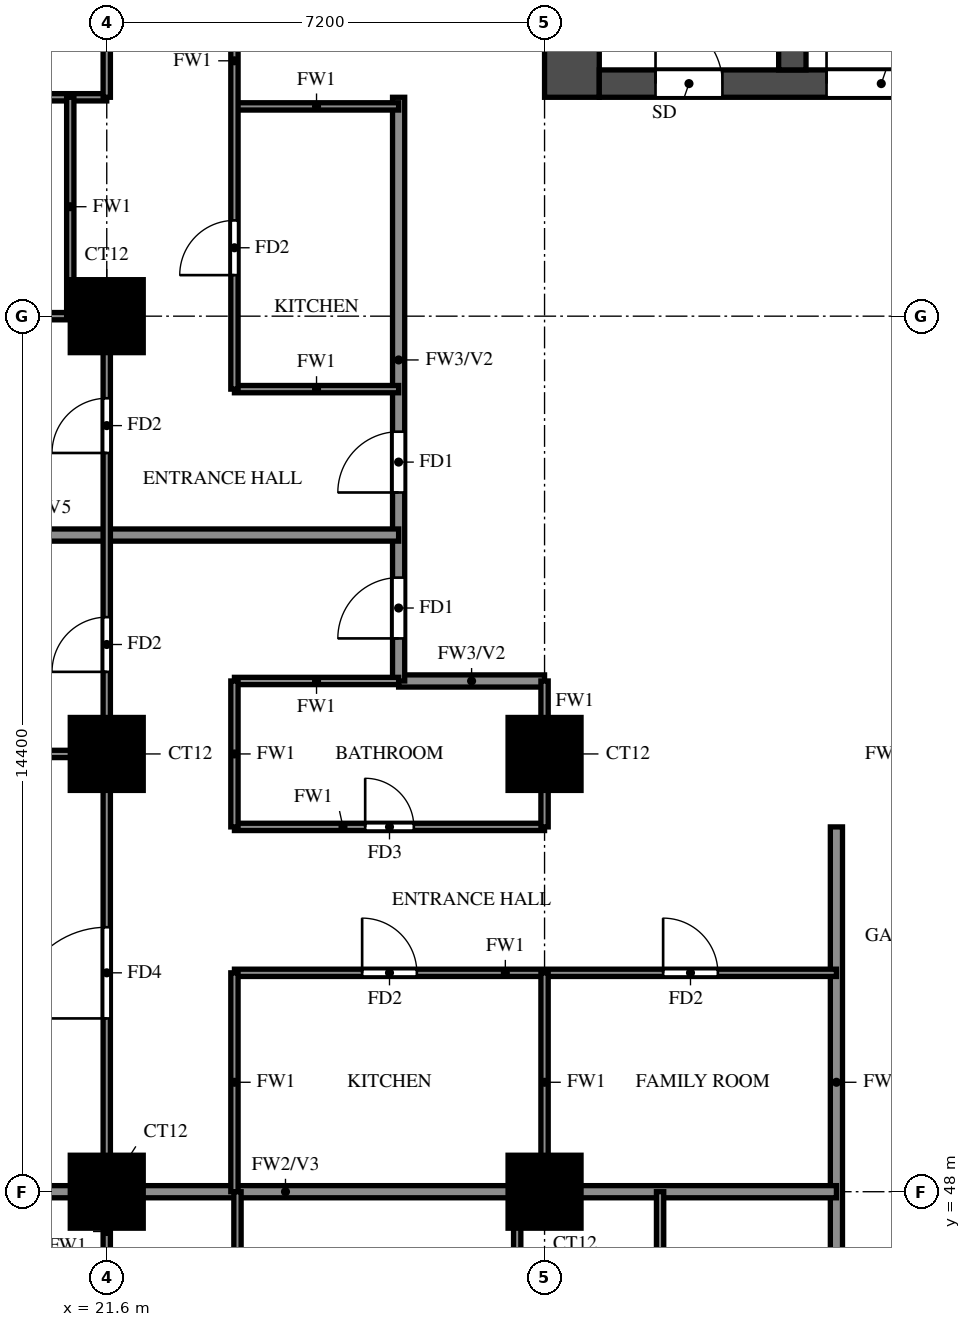
"""IFC4 building model, lengths in metres.
Left out: names, types, materials, properties, quantities, classifications, styles, units other than length and angle.
Written with IfcOpenShell. Run it as: python <this file> out.ifc"""

import sys

from ifc_helpers import new_model, si_unit, direction, frame, frame_2d, origin, origin_2d, place, context, subcontext, project, spatial, rectangle, extrude, source, transform, mapped, element, fill, save


model = new_model("IFC4")
c1 = context("Model", 3, precision=1e-05, world=origin(), true_north=direction((0.0, 1.0)))
c2 = subcontext(c1, "Body", "Model", "MODEL_VIEW")
j1 = project(units=[si_unit("LENGTHUNIT", "METRE"), si_unit("PLANEANGLEUNIT", "RADIAN")], contexts=[c1])
p1 = place(None, origin())
s1 = spatial("IfcSite", under=j1, at=p1, CompositionType="ELEMENT")
p2 = place(p1, origin())
s2 = spatial("IfcBuilding", under=s1, at=p2, CompositionType="ELEMENT")
p3 = place(p2, frame((0.0, 0.0, 93.5)))
s3 = spatial("IfcBuildingStorey", under=s2, at=p3, CompositionType="ELEMENT", Elevation=93.5)
m1 = source(origin(), c2, "Body", "SweptSolid", [
    extrude(rectangle(XDim=1.2, YDim=1.2, at=origin_2d()), origin(), (0.0, 0.0, 1.0), 3.18),
])
for number, where, z_axis, x_axis in (
    (1, (21.6, 48.0, 0.0), (0.0, 0.0, 1.0), (1.0, 0.0, 0.0)),
    (2, (28.8, 48.0, 0.0), (0.0, 0.0, 1.0), (1.0, 0.0, 0.0)),
    (3, (21.6, 55.2, 0.0), (0.0, 0.0, 1.0), (1.0, 0.0, 0.0)),
    (4, (28.8, 55.2, 0.0), (0.0, 0.0, 1.0), (1.0, 0.0, 0.0)),
    (5, (21.6, 62.4, 0.0), (0.0, 0.0, 1.0), (1.0, 0.0, 0.0)),
):
    element("IfcColumn", number, at=place(p3, frame(where, z_axis=z_axis, x_axis=x_axis)), inside=s3, PredefinedType="COLUMN", context=c2, shape_type="MappedRepresentation", body=[
        mapped(m1, transform((0.0, 0.0, 0.0))),
    ])
p4 = place(p3, frame((29.25, 66.0, 0.0), z_axis=(0.0, 0.0, 1.0), x_axis=(0.0, 1.0, 0.0)))
e6 = element("IfcWall", 6, at=p4, inside=s3, PredefinedType="SHEAR", context=c2, shape_type="SweptSolid", body=[
    extrude(rectangle(XDim=12.0, YDim=0.9, at=frame_2d((6.0, 0.0))), origin(), (0.0, 0.0, 1.0), 3.18),
])
p5 = place(p3, frame((29.7, 66.225, 0.0), z_axis=(0.0, 0.0, 1.0), x_axis=(1.0, 0.0, 0.0)))
e7 = element("IfcWall", 7, at=p5, inside=s3, PredefinedType="SHEAR", context=c2, shape_type="SweptSolid", body=[
    extrude(rectangle(XDim=41.4, YDim=0.45, at=frame_2d((20.7, 0.0))), origin(), (0.0, 0.0, 1.0), 3.18),
])
p6 = place(p5, frame((0.925, 0.0, 0.0)))
e8 = element("IfcOpeningElement", 8, at=p6, cuts=e7, PredefinedType="OPENING", context=c2, shape_type="SweptSolid", body=[
    extrude(rectangle(XDim=1.1, YDim=2.1, at=frame_2d((0.55, 1.05))), frame((0.0, 0.235, 0.0), z_axis=(0.0, -1.0, 0.0), x_axis=(1.0, 0.0, 0.0)), (0.0, 0.0, 1.0), 0.47),
])
p7 = place(p5, frame((3.738, 0.0, 0.0)))
e9 = element("IfcOpeningElement", 9, at=p7, cuts=e7, PredefinedType="OPENING", context=c2, shape_type="SweptSolid", body=[
    extrude(rectangle(XDim=1.8, YDim=2.1, at=frame_2d((0.9, 1.05))), frame((0.0, 0.235, 0.0), z_axis=(0.0, -1.0, 0.0), x_axis=(1.0, 0.0, 0.0)), (0.0, 0.0, 1.0), 0.47),
])
p8 = place(p3, frame((32.875, 66.45, 0.0), z_axis=(0.0, 0.0, 1.0), x_axis=(0.0, 1.0, 0.0)))
e10 = element("IfcWall", 10, at=p8, inside=s3, PredefinedType="SHEAR", context=c2, shape_type="SweptSolid", body=[
    extrude(rectangle(XDim=10.65, YDim=0.45, at=frame_2d((5.325, 0.0))), origin(), (0.0, 0.0, 1.0), 3.18),
])
p9 = place(p3, frame((26.4, 56.4, 0.0), z_axis=(0.0, 0.0, 1.0), x_axis=(1.0, 0.0, 0.0)))
e11 = element("IfcWall", 11, at=p9, inside=s3, PredefinedType="SOLIDWALL", context=c2, shape_type="SweptSolid", body=[
    extrude(rectangle(XDim=2.4, YDim=0.2, at=frame_2d((1.2, 0.0))), origin(), (0.0, 0.0, 1.0), 3.18),
])
p10 = place(p3, frame((26.4, 56.4, 0.0), z_axis=(0.0, 0.0, 1.0), x_axis=(0.0, 1.0, 0.0)))
e12 = element("IfcWall", 12, at=p10, inside=s3, PredefinedType="SOLIDWALL", context=c2, shape_type="SweptSolid", body=[
    extrude(rectangle(XDim=9.6, YDim=0.2, at=frame_2d((4.8, 0.0))), origin(), (0.0, 0.0, 1.0), 3.18),
])
p11 = place(p10, frame((0.7, 0.0, 0.0)))
e13 = element("IfcOpeningElement", 13, at=p11, cuts=e12, PredefinedType="OPENING", context=c2, shape_type="SweptSolid", body=[
    extrude(rectangle(XDim=1.0, YDim=2.1, at=frame_2d((0.5, 1.05))), frame((0.0, 0.11, 0.0), z_axis=(0.0, -1.0, 0.0), x_axis=(1.0, 0.0, 0.0)), (0.0, 0.0, 1.0), 0.22),
])
p12 = place(p10, frame((3.1, 0.0, 0.0)))
e14 = element("IfcOpeningElement", 14, at=p12, cuts=e12, PredefinedType="OPENING", context=c2, shape_type="SweptSolid", body=[
    extrude(rectangle(XDim=1.0, YDim=2.1, at=frame_2d((0.5, 1.05))), frame((0.0, 0.11, 0.0), z_axis=(0.0, -1.0, 0.0), x_axis=(1.0, 0.0, 0.0)), (0.0, 0.0, 1.0), 0.22),
])
p13 = place(p3, frame((33.6, 45.6, 0.0), z_axis=(0.0, 0.0, 1.0), x_axis=(0.0, 1.0, 0.0)))
e15 = element("IfcWall", 15, at=p13, inside=s3, PredefinedType="SOLIDWALL", context=c2, shape_type="SweptSolid", body=[
    extrude(rectangle(XDim=8.4, YDim=0.2, at=frame_2d((4.2, 0.0))), origin(), (0.0, 0.0, 1.0), 3.18),
])
p14 = place(p3, frame((14.525, 48.0, 0.0), z_axis=(0.0, 0.0, 1.0), x_axis=(1.0, 0.0, 0.0)))
e16 = element("IfcWall", 16, at=p14, inside=s3, PredefinedType="SOLIDWALL", context=c2, shape_type="SweptSolid", body=[
    extrude(rectangle(XDim=19.075, YDim=0.2, at=frame_2d((9.538, 0.0))), origin(), (0.0, 0.0, 1.0), 3.18),
])
p15 = place(p3, frame((14.525, 58.8, 0.0), z_axis=(0.0, 0.0, 1.0), x_axis=(1.0, 0.0, 0.0)))
e17 = element("IfcWall", 17, at=p15, inside=s3, PredefinedType="SOLIDWALL", context=c2, shape_type="SweptSolid", body=[
    extrude(rectangle(XDim=11.875, YDim=0.2, at=frame_2d((5.938, 0.0))), origin(), (0.0, 0.0, 1.0), 2.28),
])
p16 = place(p3, frame((23.7, 51.6, 0.0), z_axis=(0.0, 0.0, 1.0), x_axis=(1.0, 0.0, 0.0)))
e18 = element("IfcWall", 18, at=p16, inside=s3, PredefinedType="PARTITIONING", context=c2, shape_type="SweptSolid", body=[
    extrude(rectangle(XDim=9.9, YDim=0.12, at=frame_2d((4.95, 0.0))), origin(), (0.0, 0.0, 1.0), 3.18),
])
p17 = place(p16, frame((2.1, 0.0, 0.0)))
e19 = element("IfcOpeningElement", 19, at=p17, cuts=e18, PredefinedType="OPENING", context=c2, shape_type="SweptSolid", body=[
    extrude(rectangle(XDim=0.9, YDim=2.1, at=frame_2d((0.45, 1.05))), frame((0.0, 0.07, 0.0), z_axis=(0.0, -1.0, 0.0), x_axis=(1.0, 0.0, 0.0)), (0.0, 0.0, 1.0), 0.14),
])
p18 = place(p16, frame((7.05, 0.0, 0.0)))
e20 = element("IfcOpeningElement", 20, at=p18, cuts=e18, PredefinedType="OPENING", context=c2, shape_type="SweptSolid", body=[
    extrude(rectangle(XDim=0.9, YDim=2.1, at=frame_2d((0.45, 1.05))), frame((0.0, 0.07, 0.0), z_axis=(0.0, -1.0, 0.0), x_axis=(1.0, 0.0, 0.0)), (0.0, 0.0, 1.0), 0.14),
])
p19 = place(p3, frame((23.7, 54.0, 0.0), z_axis=(0.0, 0.0, 1.0), x_axis=(1.0, 0.0, 0.0)))
e21 = element("IfcWall", 21, at=p19, inside=s3, PredefinedType="PARTITIONING", context=c2, shape_type="SweptSolid", body=[
    extrude(rectangle(XDim=5.1, YDim=0.12, at=frame_2d((2.55, 0.0))), origin(), (0.0, 0.0, 1.0), 3.18),
])
p20 = place(p19, frame((2.15, 0.0, 0.0)))
e22 = element("IfcOpeningElement", 22, at=p20, cuts=e21, PredefinedType="OPENING", context=c2, shape_type="SweptSolid", body=[
    extrude(rectangle(XDim=0.8, YDim=2.1, at=frame_2d((0.4, 1.05))), frame((0.0, 0.07, 0.0), z_axis=(0.0, -1.0, 0.0), x_axis=(1.0, 0.0, 0.0)), (0.0, 0.0, 1.0), 0.14),
])
p21 = place(p3, frame((14.525, 55.2, 0.0), z_axis=(0.0, 0.0, 1.0), x_axis=(1.0, 0.0, 0.0)))
e23 = element("IfcWall", 23, at=p21, inside=s3, PredefinedType="PARTITIONING", context=c2, shape_type="SweptSolid", body=[
    extrude(rectangle(XDim=7.075, YDim=0.12, at=frame_2d((3.538, 0.0))), origin(), (0.0, 0.0, 1.0), 3.18),
])
for number, where, z_axis, x_axis in (
    (24, (23.7, 56.4, 0.0), (0.0, 0.0, 1.0), (1.0, 0.0, 0.0)),
    (25, (23.7, 61.2, 0.0), (0.0, 0.0, 1.0), (1.0, 0.0, 0.0)),
):
    element("IfcWall", number, at=place(p3, frame(where, z_axis=z_axis, x_axis=x_axis)), inside=s3, PredefinedType="PARTITIONING", context=c2, shape_type="SweptSolid", body=[
        extrude(rectangle(XDim=2.7, YDim=0.12, at=frame_2d((1.35, 0.0))), origin(), (0.0, 0.0, 1.0), 3.18),
    ])
p22 = place(p3, frame((14.525, 62.4, 0.0), z_axis=(0.0, 0.0, 1.0), x_axis=(1.0, 0.0, 0.0)))
e26 = element("IfcWall", 26, at=p22, inside=s3, PredefinedType="PARTITIONING", context=c2, shape_type="SweptSolid", body=[
    extrude(rectangle(XDim=7.075, YDim=0.12, at=frame_2d((3.538, 0.0))), origin(), (0.0, 0.0, 1.0), 3.18),
])
p23 = place(p22, frame((2.837, 0.0, 0.0)))
e27 = element("IfcOpeningElement", 27, at=p23, cuts=e26, PredefinedType="OPENING", context=c2, shape_type="SweptSolid", body=[
    extrude(rectangle(XDim=0.8, YDim=2.1, at=frame_2d((0.4, 1.05))), frame((0.0, 0.07, 0.0), z_axis=(0.0, -1.0, 0.0), x_axis=(1.0, 0.0, 0.0)), (0.0, 0.0, 1.0), 0.14),
])
p24 = place(p3, frame((23.7, 65.85, 0.0), z_axis=(0.0, 0.0, 1.0), x_axis=(1.0, 0.0, 0.0)))
e28 = element("IfcWall", 28, at=p24, inside=s3, PredefinedType="PARTITIONING", context=c2, shape_type="SweptSolid", body=[
    extrude(rectangle(XDim=2.7, YDim=0.12, at=frame_2d((1.35, 0.0))), origin(), (0.0, 0.0, 1.0), 3.18),
])
p25 = place(p3, frame((14.525, 66.0, 0.0), z_axis=(0.0, 0.0, 1.0), x_axis=(1.0, 0.0, 0.0)))
e29 = element("IfcWall", 29, at=p25, inside=s3, PredefinedType="PARTITIONING", context=c2, shape_type="SweptSolid", body=[
    extrude(rectangle(XDim=7.075, YDim=0.12, at=frame_2d((3.538, 0.0))), origin(), (0.0, 0.0, 1.0), 2.28),
])
p26 = place(p3, frame((21.0, 62.4, 0.0), z_axis=(0.0, 0.0, 1.0), x_axis=(0.0, 1.0, 0.0)))
e30 = element("IfcWall", 30, at=p26, inside=s3, PredefinedType="PARTITIONING", context=c2, shape_type="SweptSolid", body=[
    extrude(rectangle(XDim=3.6, YDim=0.12, at=frame_2d((1.8, 0.0))), origin(), (0.0, 0.0, 1.0), 3.18),
])
p27 = place(p3, frame((21.6, 33.725, 0.0), z_axis=(0.0, 0.0, 1.0), x_axis=(0.0, 1.0, 0.0)))
e31 = element("IfcWall", 31, at=p27, inside=s3, PredefinedType="PARTITIONING", context=c2, shape_type="SweptSolid", body=[
    extrude(rectangle(XDim=28.675, YDim=0.12, at=frame_2d((14.337, 0.0))), origin(), (0.0, 0.0, 1.0), 3.18),
])
p28 = place(p27, frame((7.775, 0.0, 0.0)))
e32 = element("IfcOpeningElement", 32, at=p28, cuts=e31, PredefinedType="OPENING", context=c2, shape_type="SweptSolid", body=[
    extrude(rectangle(XDim=0.9, YDim=2.1, at=frame_2d((0.45, 1.05))), frame((0.0, 0.07, 0.0), z_axis=(0.0, -1.0, 0.0), x_axis=(1.0, 0.0, 0.0)), (0.0, 0.0, 1.0), 0.14),
])
p29 = place(p27, frame((17.125, 0.0, 0.0)))
e33 = element("IfcOpeningElement", 33, at=p29, cuts=e31, PredefinedType="OPENING", context=c2, shape_type="SweptSolid", body=[
    extrude(rectangle(XDim=1.5, YDim=2.1, at=frame_2d((0.75, 1.05))), frame((0.0, 0.07, 0.0), z_axis=(0.0, -1.0, 0.0), x_axis=(1.0, 0.0, 0.0)), (0.0, 0.0, 1.0), 0.14),
])
p30 = place(p27, frame((22.825, 0.0, 0.0)))
e34 = element("IfcOpeningElement", 34, at=p30, cuts=e31, PredefinedType="OPENING", context=c2, shape_type="SweptSolid", body=[
    extrude(rectangle(XDim=0.9, YDim=2.1, at=frame_2d((0.45, 1.05))), frame((0.0, 0.07, 0.0), z_axis=(0.0, -1.0, 0.0), x_axis=(1.0, 0.0, 0.0)), (0.0, 0.0, 1.0), 0.14),
])
p31 = place(p27, frame((26.425, 0.0, 0.0)))
e35 = element("IfcOpeningElement", 35, at=p31, cuts=e31, PredefinedType="OPENING", context=c2, shape_type="SweptSolid", body=[
    extrude(rectangle(XDim=0.9, YDim=2.1, at=frame_2d((0.45, 1.05))), frame((0.0, 0.07, 0.0), z_axis=(0.0, -1.0, 0.0), x_axis=(1.0, 0.0, 0.0)), (0.0, 0.0, 1.0), 0.14),
])
p32 = place(p3, frame((21.6, 66.0, 0.0), z_axis=(0.0, 0.0, 1.0), x_axis=(0.0, 1.0, 0.0)))
e36 = element("IfcWall", 36, at=p32, inside=s3, PredefinedType="PARTITIONING", context=c2, shape_type="SweptSolid", body=[
    extrude(rectangle(XDim=7.2, YDim=0.12, at=frame_2d((3.6, 0.0))), origin(), (0.0, 0.0, 1.0), 3.18),
])
p33 = place(p32, frame((1.35, 0.0, 0.0)))
e37 = element("IfcOpeningElement", 37, at=p33, cuts=e36, PredefinedType="OPENING", context=c2, shape_type="SweptSolid", body=[
    extrude(rectangle(XDim=0.9, YDim=2.1, at=frame_2d((0.45, 1.05))), frame((0.0, 0.07, 0.0), z_axis=(0.0, -1.0, 0.0), x_axis=(1.0, 0.0, 0.0)), (0.0, 0.0, 1.0), 0.14),
])
p34 = place(p32, frame((4.95, 0.0, 0.0)))
e38 = element("IfcOpeningElement", 38, at=p34, cuts=e36, PredefinedType="OPENING", context=c2, shape_type="SweptSolid", body=[
    extrude(rectangle(XDim=0.9, YDim=2.1, at=frame_2d((0.45, 1.05))), frame((0.0, 0.07, 0.0), z_axis=(0.0, -1.0, 0.0), x_axis=(1.0, 0.0, 0.0)), (0.0, 0.0, 1.0), 0.14),
])
p35 = place(p3, frame((23.7, 48.0, 0.0), z_axis=(0.0, 0.0, 1.0), x_axis=(0.0, 1.0, 0.0)))
e39 = element("IfcWall", 39, at=p35, inside=s3, PredefinedType="PARTITIONING", context=c2, shape_type="SweptSolid", body=[
    extrude(rectangle(XDim=3.6, YDim=0.12, at=frame_2d((1.8, 0.0))), origin(), (0.0, 0.0, 1.0), 3.18),
])
p36 = place(p3, frame((23.7, 54.0, 0.0), z_axis=(0.0, 0.0, 1.0), x_axis=(0.0, 1.0, 0.0)))
e40 = element("IfcWall", 40, at=p36, inside=s3, PredefinedType="PARTITIONING", context=c2, shape_type="SweptSolid", body=[
    extrude(rectangle(XDim=2.4, YDim=0.12, at=frame_2d((1.2, 0.0))), origin(), (0.0, 0.0, 1.0), 3.18),
])
p37 = place(p3, frame((23.7, 61.2, 0.0), z_axis=(0.0, 0.0, 1.0), x_axis=(0.0, 1.0, 0.0)))
e41 = element("IfcWall", 41, at=p37, inside=s3, PredefinedType="PARTITIONING", context=c2, shape_type="SweptSolid", body=[
    extrude(rectangle(XDim=12.0, YDim=0.12, at=frame_2d((6.0, 0.0))), origin(), (0.0, 0.0, 1.0), 3.18),
])
p38 = place(p37, frame((1.875, 0.0, 0.0)))
e42 = element("IfcOpeningElement", 42, at=p38, cuts=e41, PredefinedType="OPENING", context=c2, shape_type="SweptSolid", body=[
    extrude(rectangle(XDim=0.9, YDim=2.1, at=frame_2d((0.45, 1.05))), frame((0.0, 0.07, 0.0), z_axis=(0.0, -1.0, 0.0), x_axis=(1.0, 0.0, 0.0)), (0.0, 0.0, 1.0), 0.14),
])
p39 = place(p37, frame((5.875, 0.0, 0.0)))
e43 = element("IfcOpeningElement", 43, at=p39, cuts=e41, PredefinedType="OPENING", context=c2, shape_type="SweptSolid", body=[
    extrude(rectangle(XDim=0.9, YDim=2.1, at=frame_2d((0.45, 1.05))), frame((0.0, 0.07, 0.0), z_axis=(0.0, -1.0, 0.0), x_axis=(1.0, 0.0, 0.0)), (0.0, 0.0, 1.0), 0.14),
])
p40 = place(p37, frame((9.6, 0.0, 0.0)))
e44 = element("IfcOpeningElement", 44, at=p40, cuts=e41, PredefinedType="OPENING", context=c2, shape_type="SweptSolid", body=[
    extrude(rectangle(XDim=0.8, YDim=2.1, at=frame_2d((0.4, 1.05))), frame((0.0, 0.07, 0.0), z_axis=(0.0, -1.0, 0.0), x_axis=(1.0, 0.0, 0.0)), (0.0, 0.0, 1.0), 0.14),
])
for number, where, z_axis, x_axis in (
    (45, (23.75, 42.9, 0.0), (0.0, 0.0, 1.0), (0.0, 1.0, 0.0)),
    (46, (28.35, 42.9, 0.0), (0.0, 0.0, 1.0), (0.0, 1.0, 0.0)),
):
    element("IfcWall", number, at=place(p3, frame(where, z_axis=z_axis, x_axis=x_axis)), inside=s3, PredefinedType="PARTITIONING", context=c2, shape_type="SweptSolid", body=[
        extrude(rectangle(XDim=5.1, YDim=0.12, at=frame_2d((2.55, 0.0))), origin(), (0.0, 0.0, 1.0), 3.18),
    ])
p41 = place(p3, frame((28.8, 48.0, 0.0), z_axis=(0.0, 0.0, 1.0), x_axis=(0.0, 1.0, 0.0)))
e47 = element("IfcWall", 47, at=p41, inside=s3, PredefinedType="PARTITIONING", context=c2, shape_type="SweptSolid", body=[
    extrude(rectangle(XDim=3.6, YDim=0.12, at=frame_2d((1.8, 0.0))), origin(), (0.0, 0.0, 1.0), 3.18),
])
p42 = place(p3, frame((28.8, 54.0, 0.0), z_axis=(0.0, 0.0, 1.0), x_axis=(0.0, 1.0, 0.0)))
e48 = element("IfcWall", 48, at=p42, inside=s3, PredefinedType="PARTITIONING", context=c2, shape_type="SweptSolid", body=[
    extrude(rectangle(XDim=2.4, YDim=0.12, at=frame_2d((1.2, 0.0))), origin(), (0.0, 0.0, 1.0), 3.18),
])
p43 = place(p3, frame((30.7, 42.9, 0.0), z_axis=(0.0, 0.0, 1.0), x_axis=(0.0, 1.0, 0.0)))
e49 = element("IfcWall", 49, at=p43, inside=s3, PredefinedType="PARTITIONING", context=c2, shape_type="SweptSolid", body=[
    extrude(rectangle(XDim=5.1, YDim=0.12, at=frame_2d((2.55, 0.0))), origin(), (0.0, 0.0, 1.0), 3.18),
])
p44 = place(p6, origin())
e50 = element("IfcDoor", 50, at=p44, inside=s3, OperationType="SINGLE_SWING_LEFT", PredefinedType="DOOR", context=c2, shape_type="SweptSolid", body=[
    extrude(rectangle(XDim=1.1, YDim=2.1, at=frame_2d((0.55, 1.05))), frame((0.0, 0.025, 0.0), z_axis=(0.0, -1.0, 0.0), x_axis=(1.0, 0.0, 0.0)), (0.0, 0.0, 1.0), 0.05),
])
fill(e8, e50)
p45 = place(p7, origin())
e51 = element("IfcDoor", 51, at=p45, inside=s3, OperationType="DOUBLE_DOOR_SINGLE_SWING", PredefinedType="DOOR", context=c2, shape_type="SweptSolid", body=[
    extrude(rectangle(XDim=1.8, YDim=2.1, at=frame_2d((0.9, 1.05))), frame((0.0, 0.025, 0.0), z_axis=(0.0, -1.0, 0.0), x_axis=(1.0, 0.0, 0.0)), (0.0, 0.0, 1.0), 0.05),
])
fill(e9, e51)
p46 = place(p11, origin())
e52 = element("IfcDoor", 52, at=p46, inside=s3, OperationType="SINGLE_SWING_LEFT", PredefinedType="DOOR", context=c2, shape_type="SweptSolid", body=[
    extrude(rectangle(XDim=1.0, YDim=2.1, at=frame_2d((0.5, 1.05))), frame((0.0, 0.025, 0.0), z_axis=(0.0, -1.0, 0.0), x_axis=(1.0, 0.0, 0.0)), (0.0, 0.0, 1.0), 0.05),
])
fill(e13, e52)
p47 = place(p29, origin())
e53 = element("IfcDoor", 53, at=p47, inside=s3, OperationType="SINGLE_SWING_LEFT", PredefinedType="DOOR", context=c2, shape_type="SweptSolid", body=[
    extrude(rectangle(XDim=1.5, YDim=2.1, at=frame_2d((0.75, 1.05))), frame((0.0, 0.025, 0.0), z_axis=(0.0, -1.0, 0.0), x_axis=(1.0, 0.0, 0.0)), (0.0, 0.0, 1.0), 0.05),
])
fill(e33, e53)
p48 = place(p30, origin())
e54 = element("IfcDoor", 54, at=p48, inside=s3, OperationType="SINGLE_SWING_RIGHT", PredefinedType="DOOR", context=c2, shape_type="SweptSolid", body=[
    extrude(rectangle(XDim=0.9, YDim=2.1, at=frame_2d((0.45, 1.05))), frame((0.0, 0.025, 0.0), z_axis=(0.0, -1.0, 0.0), x_axis=(1.0, 0.0, 0.0)), (0.0, 0.0, 1.0), 0.05),
])
fill(e34, e54)
p49 = place(p17, origin())
e55 = element("IfcDoor", 55, at=p49, inside=s3, OperationType="SINGLE_SWING_LEFT", PredefinedType="DOOR", context=c2, shape_type="SweptSolid", body=[
    extrude(rectangle(XDim=0.9, YDim=2.1, at=frame_2d((0.45, 1.05))), frame((0.0, 0.025, 0.0), z_axis=(0.0, -1.0, 0.0), x_axis=(1.0, 0.0, 0.0)), (0.0, 0.0, 1.0), 0.05),
])
fill(e19, e55)
p50 = place(p20, origin())
e56 = element("IfcDoor", 56, at=p50, inside=s3, OperationType="SINGLE_SWING_LEFT", PredefinedType="DOOR", context=c2, shape_type="SweptSolid", body=[
    extrude(rectangle(XDim=0.8, YDim=2.1, at=frame_2d((0.4, 1.05))), frame((0.0, 0.025, 0.0), z_axis=(0.0, -1.0, 0.0), x_axis=(1.0, 0.0, 0.0)), (0.0, 0.0, 1.0), 0.05),
])
fill(e22, e56)
p51 = place(p18, origin())
e57 = element("IfcDoor", 57, at=p51, inside=s3, OperationType="SINGLE_SWING_RIGHT", PredefinedType="DOOR", context=c2, shape_type="SweptSolid", body=[
    extrude(rectangle(XDim=0.9, YDim=2.1, at=frame_2d((0.45, 1.05))), frame((0.0, 0.025, 0.0), z_axis=(0.0, -1.0, 0.0), x_axis=(1.0, 0.0, 0.0)), (0.0, 0.0, 1.0), 0.05),
])
fill(e20, e57)
p52 = place(p12, origin())
e58 = element("IfcDoor", 58, at=p52, inside=s3, OperationType="SINGLE_SWING_LEFT", PredefinedType="DOOR", context=c2, shape_type="SweptSolid", body=[
    extrude(rectangle(XDim=1.0, YDim=2.1, at=frame_2d((0.5, 1.05))), frame((0.0, 0.025, 0.0), z_axis=(0.0, -1.0, 0.0), x_axis=(1.0, 0.0, 0.0)), (0.0, 0.0, 1.0), 0.05),
])
fill(e14, e58)
p53 = place(p31, origin())
e59 = element("IfcDoor", 59, at=p53, inside=s3, OperationType="SINGLE_SWING_LEFT", PredefinedType="DOOR", context=c2, shape_type="SweptSolid", body=[
    extrude(rectangle(XDim=0.9, YDim=2.1, at=frame_2d((0.45, 1.05))), frame((0.0, 0.025, 0.0), z_axis=(0.0, -1.0, 0.0), x_axis=(1.0, 0.0, 0.0)), (0.0, 0.0, 1.0), 0.05),
])
fill(e35, e59)
p54 = place(p38, origin())
e60 = element("IfcDoor", 60, at=p54, inside=s3, OperationType="SINGLE_SWING_LEFT", PredefinedType="DOOR", context=c2, shape_type="SweptSolid", body=[
    extrude(rectangle(XDim=0.9, YDim=2.1, at=frame_2d((0.45, 1.05))), frame((0.0, 0.025, 0.0), z_axis=(0.0, -1.0, 0.0), x_axis=(1.0, 0.0, 0.0)), (0.0, 0.0, 1.0), 0.05),
])
fill(e42, e60)
save(model, sys.argv[1])
